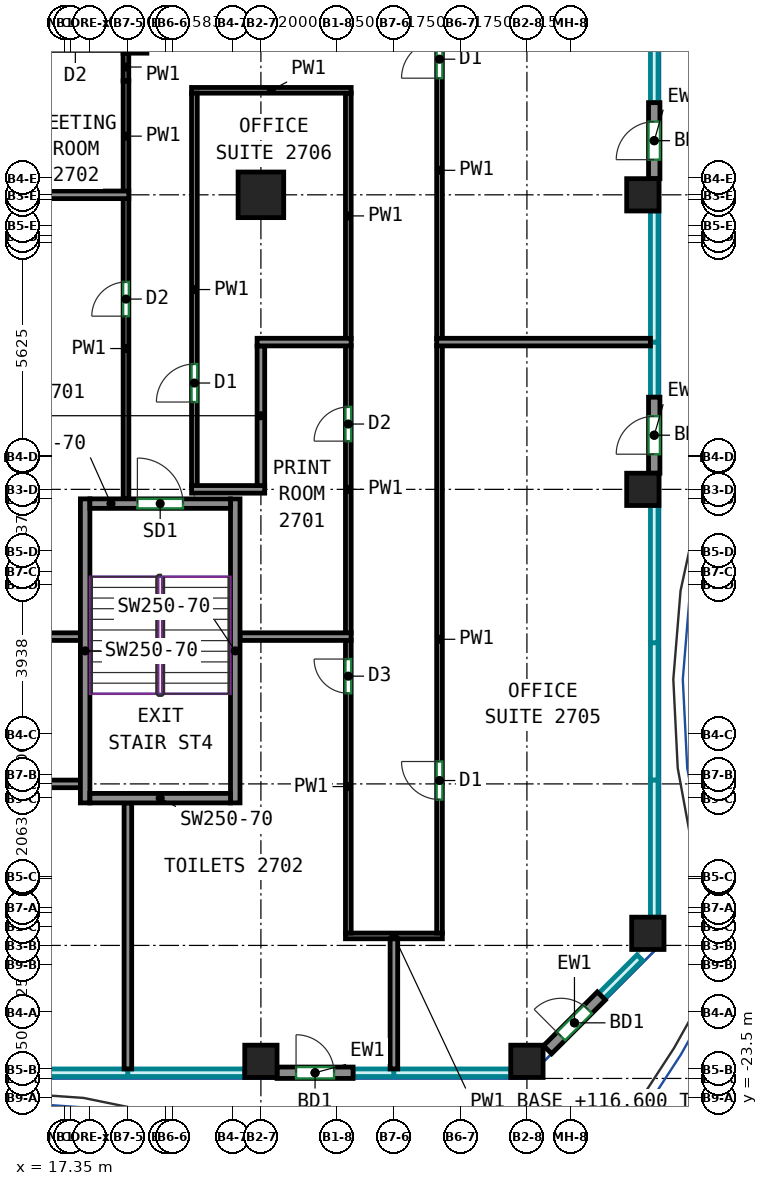
"""IFC4 building model, lengths in metres.
Left out: names, types, materials, properties, quantities, classifications, styles, units other than length and angle.
Written with IfcOpenShell. Run it as: python <this file> out.ifc"""

import sys

from ifc_helpers import new_model, si_unit, direction, frame, frame_2d, origin, origin_2d, place, context, subcontext, project, spatial, rectangle, extrude, source, transform, mapped, element, fill, save


model = new_model("IFC4")
c1 = context("Model", 3, precision=1e-05, world=origin(), true_north=direction((0.0, 1.0)))
c2 = subcontext(c1, "Body", "Model", "MODEL_VIEW")
j1 = project(units=[si_unit("LENGTHUNIT", "METRE"), si_unit("PLANEANGLEUNIT", "RADIAN")], contexts=[c1])
p1 = place(None, origin())
s1 = spatial("IfcSite", under=j1, at=p1, CompositionType="ELEMENT")
p2 = place(p1, origin())
s2 = spatial("IfcBuilding", under=s1, at=p2, CompositionType="ELEMENT")
p3 = place(p2, frame((0.0, 0.0, 116.6)))
s3 = spatial("IfcBuildingStorey", under=s2, at=p3, CompositionType="ELEMENT", Elevation=116.6)
m1 = source(origin(), c2, "Body", "SweptSolid", [
    extrude(rectangle(XDim=0.85, YDim=0.85, at=origin_2d()), origin(), (0.0, 0.0, 1.0), 3.72),
])
p4 = place(p3, frame((22.5, -22.55, 0.0), z_axis=(0.0, 0.0, 1.0), x_axis=(1.0, 0.0, 0.0)))
e1 = element("IfcColumn", 1, at=p4, inside=s3, PredefinedType="COLUMN", context=c2, shape_type="MappedRepresentation", body=[
    mapped(m1, transform((0.0, 0.0, 0.0))),
])
m2 = source(origin(), c2, "Body", "SweptSolid", [
    extrude(rectangle(XDim=1.2, YDim=1.2, at=origin_2d()), origin(), (0.0, 0.0, 1.0), 3.72),
])
p5 = place(p3, frame((22.5, 0.25, 0.0), z_axis=(0.0, 0.0, 1.0), x_axis=(1.0, 0.0, 0.0)))
e2 = element("IfcColumn", 2, at=p5, inside=s3, PredefinedType="COLUMN", context=c2, shape_type="MappedRepresentation", body=[
    mapped(m2, transform((0.0, 0.0, 0.0))),
])
for number, where, z_axis, x_axis in (
    (3, (29.5, -22.55, 0.0), (0.0, 0.0, 1.0), (1.0, 0.0, 0.0)),
    (4, (32.55, -7.5, 0.0), (0.0, 0.0, 1.0), (1.0, 0.0, 0.0)),
    (5, (32.55, 0.25, 0.0), (0.0, 0.0, 1.0), (1.0, 0.0, 0.0)),
    (6, (32.682, -19.182, 0.0), (0.0, 0.0, 1.0), (1.0, 0.0, 0.0)),
):
    element("IfcColumn", number, at=place(p3, frame(where, z_axis=z_axis, x_axis=x_axis)), inside=s3, PredefinedType="COLUMN", context=c2, shape_type="MappedRepresentation", body=[
        mapped(m1, transform((0.0, 0.0, 0.0))),
    ])
m3 = source(origin(), c2, "Body", "SweptSolid", [
    extrude(rectangle(XDim=8.0, YDim=0.25, at=frame_2d((4.0, 0.0))), origin(), (0.0, 0.0, 1.0), 3.72),
])
for number, where, z_axis, x_axis in (
    (7, (17.875, -15.75, 0.0), (0.0, 0.0, 1.0), (0.0, 1.0, 0.0)),
    (8, (21.825, -15.75, 0.0), (0.0, 0.0, 1.0), (0.0, 1.0, 0.0)),
):
    element("IfcWall", number, at=place(p3, frame(where, z_axis=z_axis, x_axis=x_axis)), inside=s3, PredefinedType="SHEAR", context=c2, shape_type="MappedRepresentation", body=[
        mapped(m3, transform((0.0, 0.0, 0.0))),
    ])
m4 = source(origin(), c2, "Body", "SweptSolid", [
    extrude(rectangle(XDim=3.7, YDim=0.25, at=frame_2d((1.85, 0.0))), origin(), (0.0, 0.0, 1.0), 3.72),
])
p6 = place(p3, frame((18.0, -15.625, 0.0), z_axis=(0.0, 0.0, 1.0), x_axis=(1.0, 0.0, 0.0)))
e9 = element("IfcWall", 9, at=p6, inside=s3, PredefinedType="SHEAR", context=c2, shape_type="MappedRepresentation", body=[
    mapped(m4, transform((0.0, 0.0, 0.0))),
])
p7 = place(p3, frame((18.0, -7.875, 0.0), z_axis=(0.0, 0.0, 1.0), x_axis=(1.0, 0.0, 0.0)))
e10 = element("IfcWall", 10, at=p7, inside=s3, PredefinedType="SHEAR", context=c2, shape_type="MappedRepresentation", body=[
    mapped(m4, transform((0.0, 0.0, 0.0))),
])
p8 = place(p7, frame((1.25, 0.0, 0.0)))
e11 = element("IfcOpeningElement", 11, at=p8, cuts=e10, PredefinedType="OPENING", context=c2, shape_type="SweptSolid", body=[
    extrude(rectangle(XDim=1.2, YDim=2.1, at=frame_2d((0.6, 1.05))), frame((0.0, 0.135, 0.0), z_axis=(0.0, -1.0, 0.0), x_axis=(1.0, 0.0, 0.0)), (0.0, 0.0, 1.0), 0.27),
])
m5 = source(origin(), c2, "Body", "SweptSolid", [
    extrude(rectangle(XDim=2.0, YDim=0.3, at=frame_2d((1.0, 0.0))), origin(), (0.0, 0.0, 1.0), 3.72),
])
p9 = place(p3, frame((22.925, -22.85, 0.0), z_axis=(0.0, 0.0, 1.0), x_axis=(1.0, 0.0, 0.0)))
e12 = element("IfcWall", 12, at=p9, inside=s3, PredefinedType="SOLIDWALL", context=c2, shape_type="MappedRepresentation", body=[
    mapped(m5, transform((0.0, 0.0, 0.0))),
])
p10 = place(p9, frame((0.5, 0.0, 0.0)))
e13 = element("IfcOpeningElement", 13, at=p10, cuts=e12, PredefinedType="OPENING", context=c2, shape_type="SweptSolid", body=[
    extrude(rectangle(XDim=1.0, YDim=2.1, at=frame_2d((0.5, 1.05))), frame((0.0, 0.16, 0.0), z_axis=(0.0, -1.0, 0.0), x_axis=(1.0, 0.0, 0.0)), (0.0, 0.0, 1.0), 0.32),
])
p11 = place(p3, frame((30.044, -22.244, 0.0), z_axis=(0.0, 0.0, 1.0), x_axis=(0.707045742145, 0.70716781496, 0.0)))
e14 = element("IfcWall", 14, at=p11, inside=s3, PredefinedType="SOLIDWALL", context=c2, shape_type="MappedRepresentation", body=[
    mapped(m5, transform((0.0, 0.0, 0.0))),
])
p12 = place(p11, frame((0.5, 0.0, 0.0)))
e15 = element("IfcOpeningElement", 15, at=p12, cuts=e14, PredefinedType="OPENING", context=c2, shape_type="SweptSolid", body=[
    extrude(rectangle(XDim=1.0, YDim=2.1, at=frame_2d((0.5, 1.05))), frame((0.0, 0.16, 0.0), z_axis=(0.0, -1.0, 0.0), x_axis=(1.0, 0.0, 0.0)), (0.0, 0.0, 1.0), 0.32),
])
p13 = place(p3, frame((32.85, -7.075, 0.0), z_axis=(0.0, 0.0, 1.0), x_axis=(0.0, 1.0, 0.0)))
e16 = element("IfcWall", 16, at=p13, inside=s3, PredefinedType="SOLIDWALL", context=c2, shape_type="MappedRepresentation", body=[
    mapped(m5, transform((0.0, 0.0, 0.0))),
])
p14 = place(p13, frame((0.5, 0.0, 0.0)))
e17 = element("IfcOpeningElement", 17, at=p14, cuts=e16, PredefinedType="OPENING", context=c2, shape_type="SweptSolid", body=[
    extrude(rectangle(XDim=1.0, YDim=2.1, at=frame_2d((0.5, 1.05))), frame((0.0, 0.16, 0.0), z_axis=(0.0, -1.0, 0.0), x_axis=(1.0, 0.0, 0.0)), (0.0, 0.0, 1.0), 0.32),
])
p15 = place(p3, frame((32.85, 0.675, 0.0), z_axis=(0.0, 0.0, 1.0), x_axis=(0.0, 1.0, 0.0)))
e18 = element("IfcWall", 18, at=p15, inside=s3, PredefinedType="SOLIDWALL", context=c2, shape_type="MappedRepresentation", body=[
    mapped(m5, transform((0.0, 0.0, 0.0))),
])
p16 = place(p15, frame((0.5, 0.0, 0.0)))
e19 = element("IfcOpeningElement", 19, at=p16, cuts=e18, PredefinedType="OPENING", context=c2, shape_type="SweptSolid", body=[
    extrude(rectangle(XDim=1.0, YDim=2.1, at=frame_2d((0.5, 1.05))), frame((0.0, 0.16, 0.0), z_axis=(0.0, -1.0, 0.0), x_axis=(1.0, 0.0, 0.0)), (0.0, 0.0, 1.0), 0.32),
])
p17 = place(p3, frame((18.95, -7.75, 0.0), z_axis=(0.0, 0.0, 1.0), x_axis=(0.0, 1.0, 0.0)))
e20 = element("IfcWall", 20, at=p17, inside=s3, PredefinedType="PARTITIONING", context=c2, shape_type="SweptSolid", body=[
    extrude(rectangle(XDim=7.91, YDim=0.15, at=frame_2d((3.955, 0.0))), origin(), (0.0, 0.0, 1.0), 3.72),
])
p18 = place(p17, frame((4.807, 0.0, 0.0)))
e21 = element("IfcOpeningElement", 21, at=p18, cuts=e20, PredefinedType="OPENING", context=c2, shape_type="SweptSolid", body=[
    extrude(rectangle(XDim=0.9, YDim=2.1, at=frame_2d((0.45, 1.05))), frame((0.0, 0.085, 0.0), z_axis=(0.0, -1.0, 0.0), x_axis=(1.0, 0.0, 0.0)), (0.0, 0.0, 1.0), 0.17),
])
p19 = place(p3, frame((24.725, -19.25, 0.0), z_axis=(0.0, 0.0, 1.0), x_axis=(1.0, 0.0, 0.0)))
e22 = element("IfcWall", 22, at=p19, inside=s3, PredefinedType="PARTITIONING", context=c2, shape_type="SweptSolid", body=[
    extrude(rectangle(XDim=2.55, YDim=0.15, at=frame_2d((1.275, 0.0))), origin(), (0.0, 0.0, 1.0), 3.07),
])
p20 = place(p3, frame((24.8, -19.175, 0.0), z_axis=(0.0, 0.0, 1.0), x_axis=(0.0, 1.0, 0.0)))
e23 = element("IfcWall", 23, at=p20, inside=s3, PredefinedType="PARTITIONING", context=c2, shape_type="SweptSolid", body=[
    extrude(rectangle(XDim=7.71, YDim=0.15, at=frame_2d((3.855, 0.0))), origin(), (0.0, 0.0, 1.0), 3.72),
])
p21 = place(p20, frame((6.31, 0.0, 0.0)))
e24 = element("IfcOpeningElement", 24, at=p21, cuts=e23, PredefinedType="OPENING", context=c2, shape_type="SweptSolid", body=[
    extrude(rectangle(XDim=0.9, YDim=2.1, at=frame_2d((0.45, 1.05))), frame((0.0, 0.085, 0.0), z_axis=(0.0, -1.0, 0.0), x_axis=(1.0, 0.0, 0.0)), (0.0, 0.0, 1.0), 0.17),
])
p22 = place(p3, frame((27.2, -19.175, 0.0), z_axis=(0.0, 0.0, 1.0), x_axis=(0.0, 1.0, 0.0)))
e25 = element("IfcWall", 25, at=p22, inside=s3, PredefinedType="PARTITIONING", context=c2, shape_type="SweptSolid", body=[
    extrude(rectangle(XDim=15.46, YDim=0.15, at=frame_2d((7.73, 0.0))), origin(), (0.0, 0.0, 1.0), 3.72),
])
p23 = place(p22, frame((3.514, 0.0, 0.0)))
e26 = element("IfcOpeningElement", 26, at=p23, cuts=e25, PredefinedType="OPENING", context=c2, shape_type="SweptSolid", body=[
    extrude(rectangle(XDim=1.0, YDim=2.1, at=frame_2d((0.5, 1.05))), frame((0.0, 0.085, 0.0), z_axis=(0.0, -1.0, 0.0), x_axis=(1.0, 0.0, 0.0)), (0.0, 0.0, 1.0), 0.17),
])
p24 = place(p3, frame((24.8, -11.285, 0.0), z_axis=(0.0, 0.0, 1.0), x_axis=(0.0, 1.0, 0.0)))
e27 = element("IfcWall", 27, at=p24, inside=s3, PredefinedType="PARTITIONING", context=c2, shape_type="SweptSolid", body=[
    extrude(rectangle(XDim=7.57, YDim=0.15, at=frame_2d((3.785, 0.0))), origin(), (0.0, 0.0, 1.0), 3.72),
])
p25 = place(p24, frame((5.054, 0.0, 0.0)))
e28 = element("IfcOpeningElement", 28, at=p25, cuts=e27, PredefinedType="OPENING", context=c2, shape_type="SweptSolid", body=[
    extrude(rectangle(XDim=0.9, YDim=2.1, at=frame_2d((0.45, 1.05))), frame((0.0, 0.085, 0.0), z_axis=(0.0, -1.0, 0.0), x_axis=(1.0, 0.0, 0.0)), (0.0, 0.0, 1.0), 0.17),
])
p26 = place(p3, frame((24.8, -3.535, 0.0), z_axis=(0.0, 0.0, 1.0), x_axis=(0.0, 1.0, 0.0)))
e29 = element("IfcWall", 29, at=p26, inside=s3, PredefinedType="PARTITIONING", context=c2, shape_type="SweptSolid", body=[
    extrude(rectangle(XDim=6.46, YDim=0.15, at=frame_2d((3.23, 0.0))), origin(), (0.0, 0.0, 1.0), 3.72),
])
p27 = place(p3, frame((20.675, 3.0, 0.0), z_axis=(0.0, 0.0, 1.0), x_axis=(1.0, 0.0, 0.0)))
e30 = element("IfcWall", 30, at=p27, inside=s3, PredefinedType="PARTITIONING", context=c2, shape_type="SweptSolid", body=[
    extrude(rectangle(XDim=4.2, YDim=0.15, at=frame_2d((2.1, 0.0))), origin(), (0.0, 0.0, 1.0), 3.72),
])
p28 = place(p3, frame((20.75, -7.41, 0.0), z_axis=(0.0, 0.0, 1.0), x_axis=(0.0, 1.0, 0.0)))
e31 = element("IfcWall", 31, at=p28, inside=s3, PredefinedType="PARTITIONING", context=c2, shape_type="SweptSolid", body=[
    extrude(rectangle(XDim=10.335, YDim=0.15, at=frame_2d((5.167, 0.0))), origin(), (0.0, 0.0, 1.0), 3.72),
])
p29 = place(p28, frame((2.208, 0.0, 0.0)))
e32 = element("IfcOpeningElement", 32, at=p29, cuts=e31, PredefinedType="OPENING", context=c2, shape_type="SweptSolid", body=[
    extrude(rectangle(XDim=1.0, YDim=2.1, at=frame_2d((0.5, 1.05))), frame((0.0, 0.085, 0.0), z_axis=(0.0, -1.0, 0.0), x_axis=(1.0, 0.0, 0.0)), (0.0, 0.0, 1.0), 0.17),
])
p30 = place(p3, frame((18.95, 0.34, 0.0), z_axis=(0.0, 0.0, 1.0), x_axis=(0.0, 1.0, 0.0)))
e33 = element("IfcWall", 33, at=p30, inside=s3, PredefinedType="PARTITIONING", context=c2, shape_type="SweptSolid", body=[
    extrude(rectangle(XDim=2.908, YDim=0.15, at=frame_2d((1.454, 0.0))), origin(), (0.0, 0.0, 1.0), 3.72),
])
p31 = place(p3, frame((18.948, 3.977, 0.0), z_axis=(0.0, 0.0, 1.0), x_axis=(0.0, -1.0, 0.0)))
e34 = element("IfcWall", 34, at=p31, inside=s3, PredefinedType="PARTITIONING", context=c2, shape_type="SweptSolid", body=[
    extrude(rectangle(XDim=0.729, YDim=0.15, at=frame_2d((0.365, 0.0))), origin(), (0.0, 0.0, 1.0), 3.72),
])
p32 = place(p3, frame((18.873, 4.052, 0.0), z_axis=(0.0, 0.0, 1.0), x_axis=(1.0, 0.0, 0.0)))
e35 = element("IfcWall", 35, at=p32, inside=s3, PredefinedType="PARTITIONING", context=c2, shape_type="SweptSolid", body=[
    extrude(rectangle(XDim=0.627, YDim=0.15, at=frame_2d((0.313, 0.0))), origin(), (0.0, 0.0, 1.0), 3.72),
])
p33 = place(p3, frame((27.2, -3.535, 0.0), z_axis=(0.0, 0.0, 1.0), x_axis=(0.0, 1.0, 0.0)))
e36 = element("IfcWall", 36, at=p33, inside=s3, PredefinedType="PARTITIONING", context=c2, shape_type="SweptSolid", body=[
    extrude(rectangle(XDim=8.86, YDim=0.15, at=frame_2d((4.43, 0.0))), origin(), (0.0, 0.0, 1.0), 3.72),
])
p34 = place(p33, frame((6.854, 0.0, 0.0)))
e37 = element("IfcOpeningElement", 37, at=p34, cuts=e36, PredefinedType="OPENING", context=c2, shape_type="SweptSolid", body=[
    extrude(rectangle(XDim=1.0, YDim=2.1, at=frame_2d((0.5, 1.05))), frame((0.0, 0.085, 0.0), z_axis=(0.0, -1.0, 0.0), x_axis=(1.0, 0.0, 0.0)), (0.0, 0.0, 1.0), 0.17),
])
p35 = place(p3, frame((16.1, -15.25, 0.0), z_axis=(0.0, 0.0, 1.0), x_axis=(1.0, 0.0, 0.0)))
e38 = element("IfcWall", 38, at=p35, inside=s3, PredefinedType="PARTITIONING", context=c2, shape_type="SweptSolid", body=[
    extrude(rectangle(XDim=1.65, YDim=0.2, at=frame_2d((0.825, 0.0))), origin(), (0.0, 0.0, 1.0), 3.72),
])
p36 = place(p3, frame((11.9, -11.375, 0.0), z_axis=(0.0, 0.0, 1.0), x_axis=(1.0, 0.0, 0.0)))
e39 = element("IfcWall", 39, at=p36, inside=s3, PredefinedType="PARTITIONING", context=c2, shape_type="SweptSolid", body=[
    extrude(rectangle(XDim=5.85, YDim=0.2, at=frame_2d((2.925, 0.0))), origin(), (0.0, 0.0, 1.0), 3.72),
])
p37 = place(p3, frame((19.0, -22.75, 0.0), z_axis=(0.0, 0.0, 1.0), x_axis=(0.0, 1.0, 0.0)))
e40 = element("IfcWall", 40, at=p37, inside=s3, PredefinedType="PARTITIONING", context=c2, shape_type="SweptSolid", body=[
    extrude(rectangle(XDim=7.0, YDim=0.2, at=frame_2d((3.5, 0.0))), origin(), (0.0, 0.0, 1.0), 3.72),
])
p38 = place(p3, frame((16.1, 0.25, 0.0), z_axis=(0.0, 0.0, 1.0), x_axis=(1.0, 0.0, 0.0)))
e41 = element("IfcWall", 41, at=p38, inside=s3, PredefinedType="PARTITIONING", context=c2, shape_type="SweptSolid", body=[
    extrude(rectangle(XDim=2.924, YDim=0.2, at=frame_2d((1.462, 0.0))), origin(), (0.0, 0.0, 1.0), 3.72),
])
p39 = place(p3, frame((26.0, -22.75, 0.0), z_axis=(0.0, 0.0, 1.0), x_axis=(0.0, 1.0, 0.0)))
e42 = element("IfcWall", 42, at=p39, inside=s3, PredefinedType="PARTITIONING", context=c2, shape_type="SweptSolid", body=[
    extrude(rectangle(XDim=3.424, YDim=0.2, at=frame_2d((1.712, 0.0))), origin(), (0.0, 0.0, 1.0), 3.72),
])
p40 = place(p3, frame((21.95, -11.375, 0.0), z_axis=(0.0, 0.0, 1.0), x_axis=(1.0, 0.0, 0.0)))
e43 = element("IfcWall", 43, at=p40, inside=s3, PredefinedType="PARTITIONING", context=c2, shape_type="SweptSolid", body=[
    extrude(rectangle(XDim=2.924, YDim=0.2, at=frame_2d((1.462, 0.0))), origin(), (0.0, 0.0, 1.0), 3.72),
])
p41 = place(p3, frame((27.126, -3.625, 0.0), z_axis=(0.0, 0.0, 1.0), x_axis=(1.0, 0.0, 0.0)))
e44 = element("IfcWall", 44, at=p41, inside=s3, PredefinedType="PARTITIONING", context=c2, shape_type="SweptSolid", body=[
    extrude(rectangle(XDim=5.624, YDim=0.2, at=frame_2d((2.812, 0.0))), origin(), (0.0, 0.0, 1.0), 3.72),
])
p42 = place(p3, frame((22.6, -7.5, 0.0), z_axis=(0.0, 0.0, 1.0), x_axis=(-1.0, 0.0, 0.0)))
e45 = element("IfcWall", 45, at=p42, inside=s3, PredefinedType="PARTITIONING", context=c2, shape_type="SweptSolid", body=[
    extrude(rectangle(XDim=1.924, YDim=0.2, at=frame_2d((0.962, 0.0))), origin(), (0.0, 0.0, 1.0), 3.72),
])
p43 = place(p3, frame((22.5, -3.725, 0.0), z_axis=(0.0, 0.0, 1.0), x_axis=(0.0, -1.0, 0.0)))
e46 = element("IfcWall", 46, at=p43, inside=s3, PredefinedType="PARTITIONING", context=c2, shape_type="SweptSolid", body=[
    extrude(rectangle(XDim=3.675, YDim=0.2, at=frame_2d((1.837, 0.0))), origin(), (0.0, 0.0, 1.0), 3.07),
])
p44 = place(p3, frame((22.4, -3.625, 0.0), z_axis=(0.0, 0.0, 1.0), x_axis=(1.0, 0.0, 0.0)))
e47 = element("IfcWall", 47, at=p44, inside=s3, PredefinedType="PARTITIONING", context=c2, shape_type="SweptSolid", body=[
    extrude(rectangle(XDim=2.474, YDim=0.2, at=frame_2d((1.237, 0.0))), origin(), (0.0, 0.0, 1.0), 3.72),
])
p45 = place(p10, origin())
e48 = element("IfcDoor", 48, at=p45, inside=s3, OperationType="SINGLE_SWING_LEFT", PredefinedType="DOOR", context=c2, shape_type="SweptSolid", body=[
    extrude(rectangle(XDim=1.0, YDim=2.1, at=frame_2d((0.5, 1.05))), frame((0.0, 0.025, 0.0), z_axis=(0.0, -1.0, 0.0), x_axis=(1.0, 0.0, 0.0)), (0.0, 0.0, 1.0), 0.05),
])
fill(e13, e48)
p46 = place(p12, origin())
e49 = element("IfcDoor", 49, at=p46, inside=s3, OperationType="SINGLE_SWING_LEFT", PredefinedType="DOOR", context=c2, shape_type="SweptSolid", body=[
    extrude(rectangle(XDim=1.0, YDim=2.1, at=frame_2d((0.5, 1.05))), frame((0.0, 0.025, 0.0), z_axis=(0.0, -1.0, 0.0), x_axis=(1.0, 0.0, 0.0)), (0.0, 0.0, 1.0), 0.05),
])
fill(e15, e49)
p47 = place(p14, origin())
e50 = element("IfcDoor", 50, at=p47, inside=s3, OperationType="SINGLE_SWING_LEFT", PredefinedType="DOOR", context=c2, shape_type="SweptSolid", body=[
    extrude(rectangle(XDim=1.0, YDim=2.1, at=frame_2d((0.5, 1.05))), frame((0.0, 0.025, 0.0), z_axis=(0.0, -1.0, 0.0), x_axis=(1.0, 0.0, 0.0)), (0.0, 0.0, 1.0), 0.05),
])
fill(e17, e50)
p48 = place(p16, origin())
e51 = element("IfcDoor", 51, at=p48, inside=s3, OperationType="SINGLE_SWING_LEFT", PredefinedType="DOOR", context=c2, shape_type="SweptSolid", body=[
    extrude(rectangle(XDim=1.0, YDim=2.1, at=frame_2d((0.5, 1.05))), frame((0.0, 0.025, 0.0), z_axis=(0.0, -1.0, 0.0), x_axis=(1.0, 0.0, 0.0)), (0.0, 0.0, 1.0), 0.05),
])
fill(e19, e51)
p49 = place(p8, origin())
e52 = element("IfcDoor", 52, at=p49, inside=s3, OperationType="DOUBLE_DOOR_SINGLE_SWING", PredefinedType="DOOR", context=c2, shape_type="SweptSolid", body=[
    extrude(rectangle(XDim=1.2, YDim=2.1, at=frame_2d((0.6, 1.05))), frame((0.0, 0.025, 0.0), z_axis=(0.0, -1.0, 0.0), x_axis=(1.0, 0.0, 0.0)), (0.0, 0.0, 1.0), 0.05),
])
fill(e11, e52)
p50 = place(p23, origin())
e53 = element("IfcDoor", 53, at=p50, inside=s3, OperationType="SINGLE_SWING_RIGHT", PredefinedType="DOOR", context=c2, shape_type="SweptSolid", body=[
    extrude(rectangle(XDim=1.0, YDim=2.1, at=frame_2d((0.5, 1.05))), frame((0.0, 0.025, 0.0), z_axis=(0.0, -1.0, 0.0), x_axis=(1.0, 0.0, 0.0)), (0.0, 0.0, 1.0), 0.05),
])
fill(e26, e53)
p51 = place(p21, origin())
e54 = element("IfcDoor", 54, at=p51, inside=s3, OperationType="SINGLE_SWING_RIGHT", PredefinedType="DOOR", context=c2, shape_type="SweptSolid", body=[
    extrude(rectangle(XDim=0.9, YDim=2.1, at=frame_2d((0.45, 1.05))), frame((0.0, 0.025, 0.0), z_axis=(0.0, -1.0, 0.0), x_axis=(1.0, 0.0, 0.0)), (0.0, 0.0, 1.0), 0.05),
])
fill(e24, e54)
p52 = place(p25, origin())
e55 = element("IfcDoor", 55, at=p52, inside=s3, OperationType="SINGLE_SWING_LEFT", PredefinedType="DOOR", context=c2, shape_type="SweptSolid", body=[
    extrude(rectangle(XDim=0.9, YDim=2.1, at=frame_2d((0.45, 1.05))), frame((0.0, 0.025, 0.0), z_axis=(0.0, -1.0, 0.0), x_axis=(1.0, 0.0, 0.0)), (0.0, 0.0, 1.0), 0.05),
])
fill(e28, e55)
p53 = place(p29, origin())
e56 = element("IfcDoor", 56, at=p53, inside=s3, OperationType="SINGLE_SWING_LEFT", PredefinedType="DOOR", context=c2, shape_type="SweptSolid", body=[
    extrude(rectangle(XDim=1.0, YDim=2.1, at=frame_2d((0.5, 1.05))), frame((0.0, 0.025, 0.0), z_axis=(0.0, -1.0, 0.0), x_axis=(1.0, 0.0, 0.0)), (0.0, 0.0, 1.0), 0.05),
])
fill(e32, e56)
p54 = place(p18, origin())
e57 = element("IfcDoor", 57, at=p54, inside=s3, OperationType="SINGLE_SWING_LEFT", PredefinedType="DOOR", context=c2, shape_type="SweptSolid", body=[
    extrude(rectangle(XDim=0.9, YDim=2.1, at=frame_2d((0.45, 1.05))), frame((0.0, 0.025, 0.0), z_axis=(0.0, -1.0, 0.0), x_axis=(1.0, 0.0, 0.0)), (0.0, 0.0, 1.0), 0.05),
])
fill(e21, e57)
p55 = place(p34, origin())
e58 = element("IfcDoor", 58, at=p55, inside=s3, OperationType="SINGLE_SWING_LEFT", PredefinedType="DOOR", context=c2, shape_type="SweptSolid", body=[
    extrude(rectangle(XDim=1.0, YDim=2.1, at=frame_2d((0.5, 1.05))), frame((0.0, 0.025, 0.0), z_axis=(0.0, -1.0, 0.0), x_axis=(1.0, 0.0, 0.0)), (0.0, 0.0, 1.0), 0.05),
])
fill(e37, e58)
save(model, sys.argv[1])
